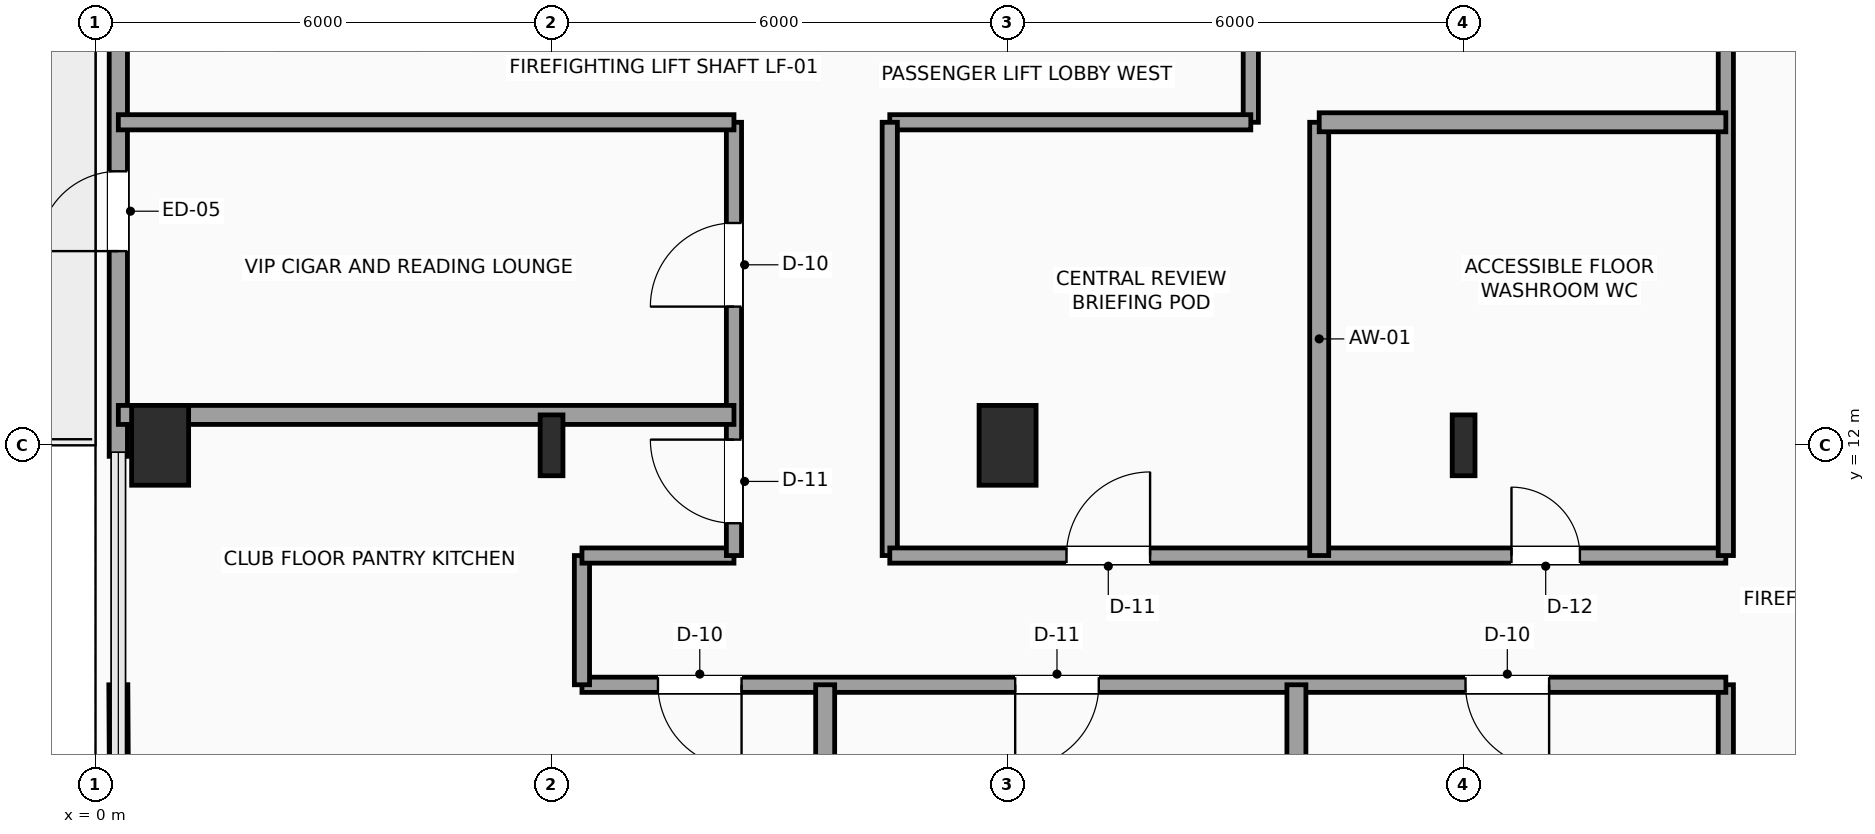
"""IFC4 building model, lengths in metres.
Left out: names, types, materials, properties, quantities, classifications, styles, units other than length and angle.
Written with IfcOpenShell. Run it as: python <this file> out.ifc"""

import sys

from ifc_helpers import new_model, si_unit, direction, frame, frame_2d, origin, origin_2d, place, context, subcontext, project, spatial, rectangle, i_section, extrude, element, fill, save


model = new_model("IFC4")
c1 = context("Model", 3, precision=1e-05, world=origin(), true_north=direction((0.0, 1.0)))
c2 = subcontext(c1, "Body", "Model", "MODEL_VIEW")
j1 = project(units=[si_unit("LENGTHUNIT", "METRE"), si_unit("PLANEANGLEUNIT", "RADIAN")], contexts=[c1])
p1 = place(None, origin())
s1 = spatial("IfcSite", under=j1, at=p1, CompositionType="ELEMENT")
p2 = place(p1, origin())
s2 = spatial("IfcBuilding", under=s1, at=p2, CompositionType="ELEMENT")
p3 = place(p2, frame((0.0, 0.0, 187.95)))
s3 = spatial("IfcBuildingStorey", under=s2, at=p3, CompositionType="ELEMENT", Elevation=187.95)
p4 = place(p3, frame((0.85, 12.0, 0.0), z_axis=(0.0, 0.0, 1.0), x_axis=(1.0, 0.0, 0.0)))
e1 = element("IfcColumn", 1, at=p4, inside=s3, PredefinedType="COLUMN", context=c2, shape_type="SweptSolid", body=[
    extrude(rectangle(XDim=0.75, YDim=1.05, at=origin_2d()), origin(), (0.0, 0.0, 1.0), 3.75),
])
p5 = place(p3, frame((6.0, 12.0, 0.0), z_axis=(0.0, 0.0, 1.0), x_axis=(1.0, 0.0, 0.0)))
e2 = element("IfcColumn", 2, at=p5, inside=s3, PredefinedType="COLUMN", context=c2, shape_type="SweptSolid", body=[
    extrude(i_section(OverallWidth=0.3, OverallDepth=0.8, WebThickness=0.018, FlangeThickness=0.033, FilletRadius=0.03, at=origin_2d()), origin(), (0.0, 0.0, 1.0), 3.75),
])
p6 = place(p3, frame((12.0, 12.0, 0.0), z_axis=(0.0, 0.0, 1.0), x_axis=(1.0, 0.0, 0.0)))
e3 = element("IfcColumn", 3, at=p6, inside=s3, PredefinedType="COLUMN", context=c2, shape_type="SweptSolid", body=[
    extrude(rectangle(XDim=0.75, YDim=1.05, at=origin_2d()), origin(), (0.0, 0.0, 1.0), 3.75),
])
p7 = place(p3, frame((18.0, 12.0, 0.0), z_axis=(0.0, 0.0, 1.0), x_axis=(1.0, 0.0, 0.0)))
e4 = element("IfcColumn", 4, at=p7, inside=s3, PredefinedType="COLUMN", context=c2, shape_type="SweptSolid", body=[
    extrude(i_section(OverallWidth=0.3, OverallDepth=0.8, WebThickness=0.018, FlangeThickness=0.033, FilletRadius=0.03, at=origin_2d()), origin(), (0.0, 0.0, 1.0), 3.75),
])
p8 = place(p3, frame((0.3, 11.855, 0.0), z_axis=(0.0, 0.0, 1.0), x_axis=(0.0, 1.0, 0.0)))
e5 = element("IfcWall", 5, at=p8, inside=s3, PredefinedType="SOLIDWALL", context=c2, shape_type="SweptSolid", body=[
    extrude(rectangle(XDim=9.29, YDim=0.24, at=frame_2d((4.645, 0.0))), origin(), (0.0, 0.0, 1.0), 3.54),
])
p9 = place(p8, frame((2.7, 0.0, 0.0)))
e6 = element("IfcOpeningElement", 6, at=p9, cuts=e5, PredefinedType="OPENING", context=c2, shape_type="SweptSolid", body=[
    extrude(rectangle(XDim=1.05, YDim=2.2, at=frame_2d((0.525, 1.1))), frame((0.0, 0.13, 0.0), z_axis=(0.0, -1.0, 0.0), x_axis=(1.0, 0.0, 0.0)), (0.0, 0.0, 1.0), 0.26),
])
p10 = place(p3, frame((21.45, 5.8, 0.0), z_axis=(0.0, 0.0, 1.0), x_axis=(0.0, 1.0, 0.0)))
e7 = element("IfcWall", 7, at=p10, inside=s3, PredefinedType="SOLIDWALL", context=c2, shape_type="SweptSolid", body=[
    extrude(rectangle(XDim=3.05, YDim=0.2, at=frame_2d((1.525, 0.0))), origin(), (0.0, 0.0, 1.0), 3.54),
])
p11 = place(p3, frame((21.45, 8.85, 0.0), z_axis=(0.0, 0.0, 1.0), x_axis=(-1.0, 0.0, 0.0)))
e8 = element("IfcWall", 8, at=p11, inside=s3, PredefinedType="SOLIDWALL", context=c2, shape_type="SweptSolid", body=[
    extrude(rectangle(XDim=15.05, YDim=0.2, at=frame_2d((7.525, 0.0))), origin(), (0.0, 0.0, 1.0), 3.132),
])
p12 = place(p11, frame((12.95, 0.0, 0.0)))
e9 = element("IfcOpeningElement", 9, at=p12, cuts=e8, PredefinedType="OPENING", context=c2, shape_type="SweptSolid", body=[
    extrude(rectangle(XDim=1.1, YDim=2.25, at=frame_2d((0.55, 1.125))), frame((0.0, 0.11, 0.0), z_axis=(0.0, -1.0, 0.0), x_axis=(1.0, 0.0, 0.0)), (0.0, 0.0, 1.0), 0.22),
])
p13 = place(p11, frame((8.25, 0.0, 0.0)))
e10 = element("IfcOpeningElement", 10, at=p13, cuts=e8, PredefinedType="OPENING", context=c2, shape_type="SweptSolid", body=[
    extrude(rectangle(XDim=1.1, YDim=2.25, at=frame_2d((0.55, 1.125))), frame((0.0, 0.11, 0.0), z_axis=(0.0, -1.0, 0.0), x_axis=(1.0, 0.0, 0.0)), (0.0, 0.0, 1.0), 0.22),
])
p14 = place(p11, frame((2.325, 0.0, 0.0)))
e11 = element("IfcOpeningElement", 11, at=p14, cuts=e8, PredefinedType="OPENING", context=c2, shape_type="SweptSolid", body=[
    extrude(rectangle(XDim=1.1, YDim=2.25, at=frame_2d((0.55, 1.125))), frame((0.0, 0.11, 0.0), z_axis=(0.0, -1.0, 0.0), x_axis=(1.0, 0.0, 0.0)), (0.0, 0.0, 1.0), 0.22),
])
p15 = place(p3, frame((6.4, 8.85, 0.0), z_axis=(0.0, 0.0, 1.0), x_axis=(0.0, 1.0, 0.0)))
e12 = element("IfcWall", 12, at=p15, inside=s3, PredefinedType="SOLIDWALL", context=c2, shape_type="SweptSolid", body=[
    extrude(rectangle(XDim=1.7, YDim=0.2, at=frame_2d((0.85, 0.0))), origin(), (0.0, 0.0, 1.0), 3.54),
])
p16 = place(p3, frame((6.4, 10.55, 0.0), z_axis=(0.0, 0.0, 1.0), x_axis=(1.0, 0.0, 0.0)))
e13 = element("IfcWall", 13, at=p16, inside=s3, PredefinedType="SOLIDWALL", context=c2, shape_type="SweptSolid", body=[
    extrude(rectangle(XDim=2.0, YDim=0.2, at=frame_2d((1.0, 0.0))), origin(), (0.0, 0.0, 1.0), 3.54),
])
p17 = place(p3, frame((8.4, 10.55, 0.0), z_axis=(0.0, 0.0, 1.0), x_axis=(0.0, 1.0, 0.0)))
e14 = element("IfcWall", 14, at=p17, inside=s3, PredefinedType="SOLIDWALL", context=c2, shape_type="SweptSolid", body=[
    extrude(rectangle(XDim=5.7, YDim=0.2, at=frame_2d((2.85, 0.0))), origin(), (0.0, 0.0, 1.0), 3.54),
])
p18 = place(p17, frame((0.425, 0.0, 0.0)))
e15 = element("IfcOpeningElement", 15, at=p18, cuts=e14, PredefinedType="OPENING", context=c2, shape_type="SweptSolid", body=[
    extrude(rectangle(XDim=1.1, YDim=2.25, at=frame_2d((0.55, 1.125))), frame((0.0, 0.11, 0.0), z_axis=(0.0, -1.0, 0.0), x_axis=(1.0, 0.0, 0.0)), (0.0, 0.0, 1.0), 0.22),
])
p19 = place(p17, frame((3.275, 0.0, 0.0)))
e16 = element("IfcOpeningElement", 16, at=p19, cuts=e14, PredefinedType="OPENING", context=c2, shape_type="SweptSolid", body=[
    extrude(rectangle(XDim=1.1, YDim=2.25, at=frame_2d((0.55, 1.125))), frame((0.0, 0.11, 0.0), z_axis=(0.0, -1.0, 0.0), x_axis=(1.0, 0.0, 0.0)), (0.0, 0.0, 1.0), 0.22),
])
p20 = place(p3, frame((8.4, 16.25, 0.0), z_axis=(0.0, 0.0, 1.0), x_axis=(-1.0, 0.0, 0.0)))
e17 = element("IfcWall", 17, at=p20, inside=s3, PredefinedType="SOLIDWALL", context=c2, shape_type="SweptSolid", body=[
    extrude(rectangle(XDim=8.1, YDim=0.2, at=frame_2d((4.05, 0.0))), origin(), (0.0, 0.0, 1.0), 3.54),
])
p21 = place(p3, frame((15.2, 17.95, 0.0), z_axis=(0.0, 0.0, 1.0), x_axis=(0.0, -1.0, 0.0)))
e18 = element("IfcWall", 18, at=p21, inside=s3, PredefinedType="SOLIDWALL", context=c2, shape_type="SweptSolid", body=[
    extrude(rectangle(XDim=1.7, YDim=0.2, at=frame_2d((0.85, 0.0))), origin(), (0.0, 0.0, 1.0), 3.54),
])
p22 = place(p3, frame((15.2, 16.25, 0.0), z_axis=(0.0, 0.0, 1.0), x_axis=(-1.0, 0.0, 0.0)))
e19 = element("IfcWall", 19, at=p22, inside=s3, PredefinedType="SOLIDWALL", context=c2, shape_type="SweptSolid", body=[
    extrude(rectangle(XDim=4.75, YDim=0.2, at=frame_2d((2.375, 0.0))), origin(), (0.0, 0.0, 1.0), 3.54),
])
p23 = place(p3, frame((10.45, 16.25, 0.0), z_axis=(0.0, 0.0, 1.0), x_axis=(0.0, -1.0, 0.0)))
e20 = element("IfcWall", 20, at=p23, inside=s3, PredefinedType="SOLIDWALL", context=c2, shape_type="SweptSolid", body=[
    extrude(rectangle(XDim=5.7, YDim=0.2, at=frame_2d((2.85, 0.0))), origin(), (0.0, 0.0, 1.0), 3.54),
])
p24 = place(p3, frame((10.45, 10.55, 0.0), z_axis=(0.0, 0.0, 1.0), x_axis=(1.0, 0.0, 0.0)))
e21 = element("IfcWall", 21, at=p24, inside=s3, PredefinedType="SOLIDWALL", context=c2, shape_type="SweptSolid", body=[
    extrude(rectangle(XDim=11.0, YDim=0.2, at=frame_2d((5.5, 0.0))), origin(), (0.0, 0.0, 1.0), 3.54),
])
p25 = place(p24, frame((2.325, 0.0, 0.0)))
e22 = element("IfcOpeningElement", 22, at=p25, cuts=e21, PredefinedType="OPENING", context=c2, shape_type="SweptSolid", body=[
    extrude(rectangle(XDim=1.1, YDim=2.25, at=frame_2d((0.55, 1.125))), frame((0.0, 0.11, 0.0), z_axis=(0.0, -1.0, 0.0), x_axis=(1.0, 0.0, 0.0)), (0.0, 0.0, 1.0), 0.22),
])
p26 = place(p24, frame((8.18, 0.0, 0.0)))
e23 = element("IfcOpeningElement", 23, at=p26, cuts=e21, PredefinedType="OPENING", context=c2, shape_type="SweptSolid", body=[
    extrude(rectangle(XDim=0.9, YDim=2.1, at=frame_2d((0.45, 1.05))), frame((0.0, 0.11, 0.0), z_axis=(0.0, -1.0, 0.0), x_axis=(1.0, 0.0, 0.0)), (0.0, 0.0, 1.0), 0.22),
])
p27 = place(p3, frame((21.45, 10.55, 0.0), z_axis=(0.0, 0.0, 1.0), x_axis=(0.0, 1.0, 0.0)))
e24 = element("IfcWall", 24, at=p27, inside=s3, PredefinedType="SOLIDWALL", context=c2, shape_type="SweptSolid", body=[
    extrude(rectangle(XDim=19.7, YDim=0.2, at=frame_2d((9.85, 0.0))), origin(), (0.0, 0.0, 1.0), 3.54),
])
p28 = place(p27, frame((9.4, 0.0, 0.0)))
e25 = element("IfcOpeningElement", 25, at=p28, cuts=e24, PredefinedType="OPENING", context=c2, shape_type="SweptSolid", body=[
    extrude(rectangle(XDim=0.95, YDim=2.15, at=frame_2d((0.475, 1.075))), frame((0.0, 0.11, 0.0), z_axis=(0.0, -1.0, 0.0), x_axis=(1.0, 0.0, 0.0)), (0.0, 0.0, 1.0), 0.22),
])
p29 = place(p27, frame((14.175, 0.0, 0.0)))
e26 = element("IfcOpeningElement", 26, at=p29, cuts=e24, PredefinedType="OPENING", context=c2, shape_type="SweptSolid", body=[
    extrude(rectangle(XDim=0.9, YDim=2.1, at=frame_2d((0.45, 1.05))), frame((0.0, 0.11, 0.0), z_axis=(0.0, -1.0, 0.0), x_axis=(1.0, 0.0, 0.0)), (0.0, 0.0, 1.0), 0.22),
])
p30 = place(p3, frame((16.1, 10.55, 0.0), z_axis=(0.0, 0.0, 1.0), x_axis=(0.0, 1.0, 0.0)))
e27 = element("IfcWall", 27, at=p30, inside=s3, PredefinedType="PARTITIONING", context=c2, shape_type="SweptSolid", body=[
    extrude(rectangle(XDim=5.7, YDim=0.25, at=frame_2d((2.85, 0.0))), origin(), (0.0, 0.0, 1.0), 3.54),
])
p31 = place(p3, frame((16.1, 16.25, 0.0), z_axis=(0.0, 0.0, 1.0), x_axis=(1.0, 0.0, 0.0)))
e28 = element("IfcWall", 28, at=p31, inside=s3, PredefinedType="PARTITIONING", context=c2, shape_type="SweptSolid", body=[
    extrude(rectangle(XDim=5.35, YDim=0.25, at=frame_2d((2.675, 0.0))), origin(), (0.0, 0.0, 1.0), 3.54),
])
p32 = place(p3, frame((0.35, 0.35, 0.0), z_axis=(0.0, 0.0, 1.0), x_axis=(-0.00588799536, 0.999982665605, 0.0)))
e29 = element("IfcWall", 29, at=p32, inside=s3, PredefinedType="PARTITIONING", context=c2, shape_type="SweptSolid", body=[
    extrude(rectangle(XDim=8.5, YDim=0.25, at=frame_2d((4.25, 0.0))), origin(), (0.0, 0.0, 1.0), 3.54),
])
for number, where, z_axis, x_axis in (
    (30, (9.6, 0.3, 0.0), (0.0, 0.0, 1.0), (0.0, 1.0, 0.0)),
    (31, (15.8, 0.3, 0.0), (0.0, 0.0, 1.0), (0.0, 1.0, 0.0)),
):
    element("IfcWall", number, at=place(p3, frame(where, z_axis=z_axis, x_axis=x_axis)), inside=s3, PredefinedType="PARTITIONING", context=c2, shape_type="SweptSolid", body=[
        extrude(rectangle(XDim=8.55, YDim=0.25, at=frame_2d((4.275, 0.0))), origin(), (0.0, 0.0, 1.0), 3.54),
    ])
p33 = place(p3, frame((0.3, 12.4, 0.0), z_axis=(0.0, 0.0, 1.0), x_axis=(1.0, 0.0, 0.0)))
e32 = element("IfcWall", 32, at=p33, inside=s3, PredefinedType="PARTITIONING", context=c2, shape_type="SweptSolid", body=[
    extrude(rectangle(XDim=8.1, YDim=0.25, at=frame_2d((4.05, 0.0))), origin(), (0.0, 0.0, 1.0), 3.54),
])
p34 = place(p9, origin())
e33 = element("IfcDoor", 33, at=p34, inside=s3, OperationType="SINGLE_SWING_LEFT", PredefinedType="DOOR", context=c2, shape_type="SweptSolid", body=[
    extrude(rectangle(XDim=1.05, YDim=2.2, at=frame_2d((0.525, 1.1))), frame((0.0, 0.025, 0.0), z_axis=(0.0, -1.0, 0.0), x_axis=(1.0, 0.0, 0.0)), (0.0, 0.0, 1.0), 0.05),
])
fill(e6, e33)
p35 = place(p12, origin())
e34 = element("IfcDoor", 34, at=p35, inside=s3, OperationType="SINGLE_SWING_LEFT", PredefinedType="DOOR", context=c2, shape_type="SweptSolid", body=[
    extrude(rectangle(XDim=1.1, YDim=2.25, at=frame_2d((0.55, 1.125))), frame((0.0, 0.025, 0.0), z_axis=(0.0, -1.0, 0.0), x_axis=(1.0, 0.0, 0.0)), (0.0, 0.0, 1.0), 0.05),
])
fill(e9, e34)
p36 = place(p13, origin())
e35 = element("IfcDoor", 35, at=p36, inside=s3, OperationType="SINGLE_SWING_RIGHT", PredefinedType="DOOR", context=c2, shape_type="SweptSolid", body=[
    extrude(rectangle(XDim=1.1, YDim=2.25, at=frame_2d((0.55, 1.125))), frame((0.0, 0.025, 0.0), z_axis=(0.0, -1.0, 0.0), x_axis=(1.0, 0.0, 0.0)), (0.0, 0.0, 1.0), 0.05),
])
fill(e10, e35)
p37 = place(p14, origin())
e36 = element("IfcDoor", 36, at=p37, inside=s3, OperationType="SINGLE_SWING_LEFT", PredefinedType="DOOR", context=c2, shape_type="SweptSolid", body=[
    extrude(rectangle(XDim=1.1, YDim=2.25, at=frame_2d((0.55, 1.125))), frame((0.0, 0.025, 0.0), z_axis=(0.0, -1.0, 0.0), x_axis=(1.0, 0.0, 0.0)), (0.0, 0.0, 1.0), 0.05),
])
fill(e11, e36)
p38 = place(p18, origin())
e37 = element("IfcDoor", 37, at=p38, inside=s3, OperationType="SINGLE_SWING_RIGHT", PredefinedType="DOOR", context=c2, shape_type="SweptSolid", body=[
    extrude(rectangle(XDim=1.1, YDim=2.25, at=frame_2d((0.55, 1.125))), frame((0.0, 0.025, 0.0), z_axis=(0.0, -1.0, 0.0), x_axis=(1.0, 0.0, 0.0)), (0.0, 0.0, 1.0), 0.05),
])
fill(e15, e37)
p39 = place(p19, origin())
e38 = element("IfcDoor", 38, at=p39, inside=s3, OperationType="SINGLE_SWING_LEFT", PredefinedType="DOOR", context=c2, shape_type="SweptSolid", body=[
    extrude(rectangle(XDim=1.1, YDim=2.25, at=frame_2d((0.55, 1.125))), frame((0.0, 0.025, 0.0), z_axis=(0.0, -1.0, 0.0), x_axis=(1.0, 0.0, 0.0)), (0.0, 0.0, 1.0), 0.05),
])
fill(e16, e38)
p40 = place(p25, origin())
e39 = element("IfcDoor", 39, at=p40, inside=s3, OperationType="SINGLE_SWING_RIGHT", PredefinedType="DOOR", context=c2, shape_type="SweptSolid", body=[
    extrude(rectangle(XDim=1.1, YDim=2.25, at=frame_2d((0.55, 1.125))), frame((0.0, 0.025, 0.0), z_axis=(0.0, -1.0, 0.0), x_axis=(1.0, 0.0, 0.0)), (0.0, 0.0, 1.0), 0.05),
])
fill(e22, e39)
p41 = place(p26, origin())
e40 = element("IfcDoor", 40, at=p41, inside=s3, OperationType="SINGLE_SWING_LEFT", PredefinedType="DOOR", context=c2, shape_type="SweptSolid", body=[
    extrude(rectangle(XDim=0.9, YDim=2.1, at=frame_2d((0.45, 1.05))), frame((0.0, 0.025, 0.0), z_axis=(0.0, -1.0, 0.0), x_axis=(1.0, 0.0, 0.0)), (0.0, 0.0, 1.0), 0.05),
])
fill(e23, e40)
save(model, sys.argv[1])
